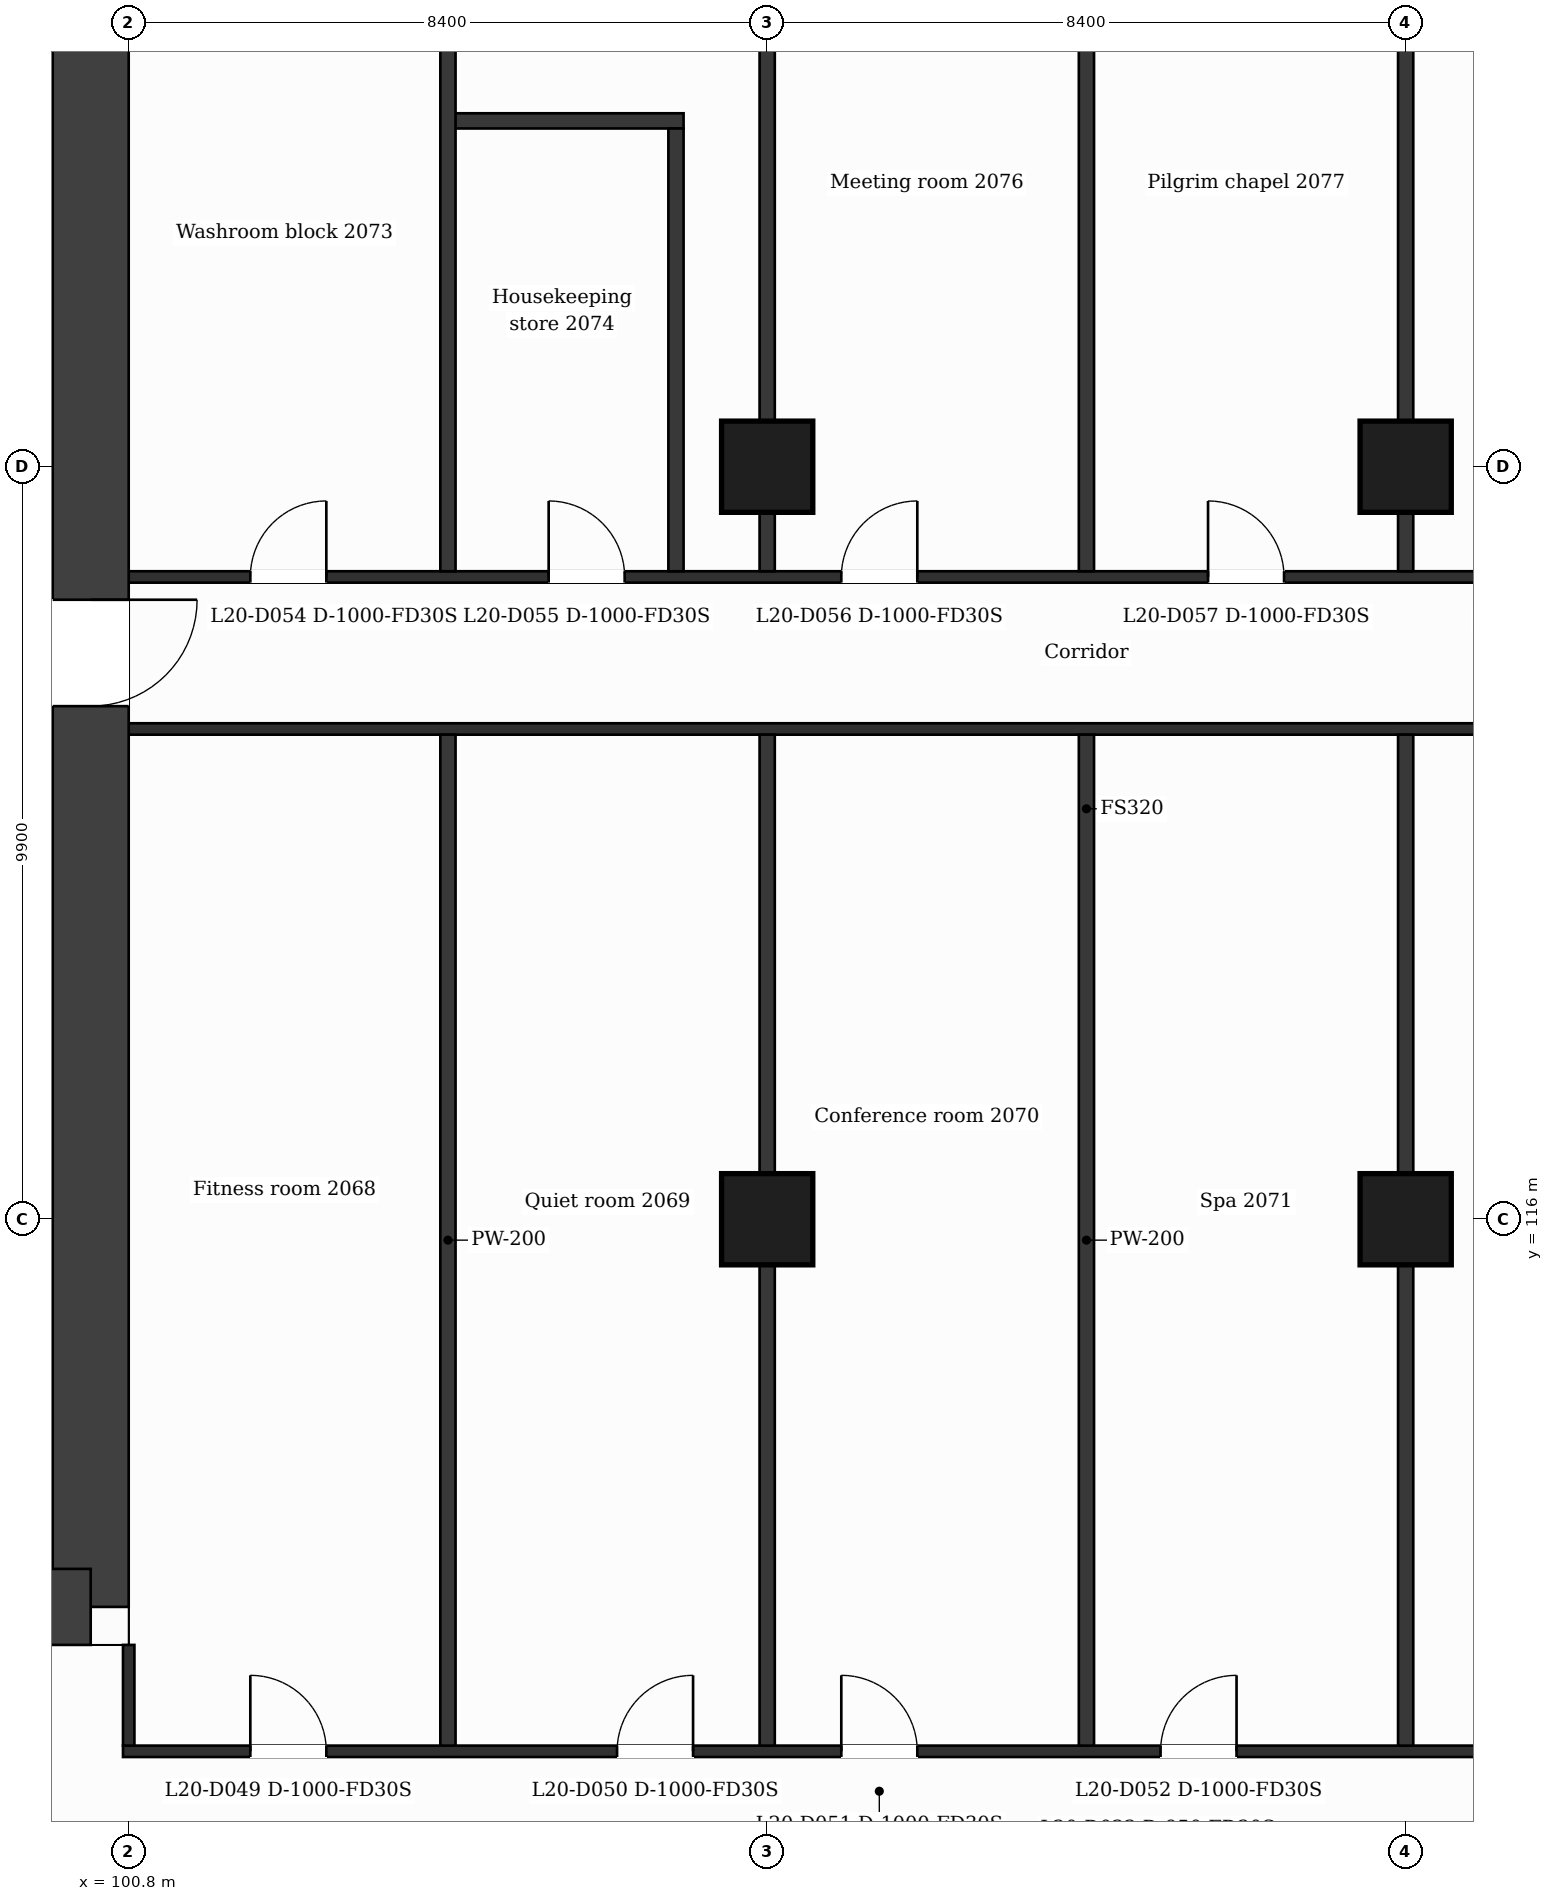
"""IFC4 building model, lengths in metres.
Left out: names, types, materials, properties, quantities, classifications, styles, units other than length and angle.
Written with IfcOpenShell. Run it as: python <this file> out.ifc"""

import sys

from ifc_helpers import new_model, si_unit, direction, frame, frame_2d, origin, origin_2d, place, context, subcontext, project, spatial, rectangle, extrude, element, fill, save


model = new_model("IFC4")
c1 = context("Model", 3, precision=1e-05, world=origin(), true_north=direction((0.0, 1.0)))
c2 = subcontext(c1, "Body", "Model", "MODEL_VIEW")
j1 = project(units=[si_unit("LENGTHUNIT", "METRE"), si_unit("PLANEANGLEUNIT", "RADIAN")], contexts=[c1])
p1 = place(None, origin())
s1 = spatial("IfcSite", under=j1, at=p1, CompositionType="ELEMENT")
p2 = place(p1, origin())
s2 = spatial("IfcBuilding", under=s1, at=p2, CompositionType="ELEMENT")
p3 = place(p2, frame((0.0, 0.0, 91.0)))
s3 = spatial("IfcBuildingStorey", under=s2, at=p3, CompositionType="ELEMENT", Elevation=91.0)
p4 = place(p3, frame((100.3, 131.9, 0.0), z_axis=(0.0, 0.0, 1.0), x_axis=(0.0, -1.0, 0.0)))
e1 = element("IfcWall", 1, at=p4, inside=s3, PredefinedType="SHEAR", context=c2, shape_type="SweptSolid", body=[
    extrude(rectangle(XDim=21.0, YDim=1.0, at=frame_2d((10.5, 0.0))), origin(), (0.0, 0.0, 1.0), 3.7),
])
p5 = place(p4, frame((7.75, 0.0, 0.0)))
e2 = element("IfcOpeningElement", 2, at=p5, cuts=e1, PredefinedType="OPENING", context=c2, shape_type="SweptSolid", body=[
    extrude(rectangle(XDim=1.4, YDim=2.1, at=frame_2d((0.7, 1.05))), frame((0.0, 0.51, 0.0), z_axis=(0.0, -1.0, 0.0), x_axis=(1.0, 0.0, 0.0)), (0.0, 0.0, 1.0), 1.02),
])
p6 = place(p3, frame((100.3, 110.9, 0.0), z_axis=(0.0, 0.0, 1.0), x_axis=(-1.0, 0.0, 0.0)))
e3 = element("IfcWall", 3, at=p6, inside=s3, PredefinedType="SHEAR", context=c2, shape_type="SweptSolid", body=[
    extrude(rectangle(XDim=14.059, YDim=1.0, at=frame_2d((7.03, 0.0))), origin(), (0.0, 0.0, 1.0), 3.7),
])
p7 = place(p6, frame((5.802, 0.0, 0.0)))
e4 = element("IfcOpeningElement", 4, at=p7, cuts=e3, PredefinedType="OPENING", context=c2, shape_type="SweptSolid", body=[
    extrude(rectangle(XDim=1.4, YDim=2.1, at=frame_2d((0.7, 1.05))), frame((0.0, 0.51, 0.0), z_axis=(0.0, -1.0, 0.0), x_axis=(1.0, 0.0, 0.0)), (0.0, 0.0, 1.0), 1.02),
])
p8 = place(p3, frame((94.9, 116.5, 0.0), z_axis=(0.0, 0.0, 1.0), x_axis=(1.0, 0.0, 0.0)))
e5 = element("IfcWall", 5, at=p8, inside=s3, PredefinedType="SHEAR", context=c2, shape_type="SweptSolid", body=[
    extrude(rectangle(XDim=4.9, YDim=1.0, at=frame_2d((2.45, 0.0))), origin(), (0.0, 0.0, 1.0), 3.7),
])
for number, where, z_axis, x_axis in (
    (6, (109.2, 116.0, 0.0), (0.0, 0.0, 1.0), (1.0, 0.0, 0.0)),
    (7, (117.6, 116.0, 0.0), (0.0, 0.0, 1.0), (1.0, 0.0, 0.0)),
    (8, (109.2, 125.9, 0.0), (0.0, 0.0, 1.0), (1.0, 0.0, 0.0)),
    (9, (117.6, 125.9, 0.0), (0.0, 0.0, 1.0), (1.0, 0.0, 0.0)),
):
    element("IfcColumn", number, at=place(p3, frame(where, z_axis=z_axis, x_axis=x_axis)), inside=s3, PredefinedType="COLUMN", context=c2, shape_type="SweptSolid", body=[
        extrude(rectangle(XDim=1.2, YDim=1.2, at=origin_2d()), origin(), (0.0, 0.0, 1.0), 3.7),
    ])
p9 = place(p3, frame((100.725, 109.0, 0.0), z_axis=(0.0, 0.0, 1.0), x_axis=(1.0, 0.0, 0.0)))
e10 = element("IfcWall", 10, at=p9, inside=s3, PredefinedType="PARTITIONING", context=c2, shape_type="SweptSolid", body=[
    extrude(rectangle(XDim=25.35, YDim=0.15, at=frame_2d((12.675, 0.0))), origin(), (0.0, 0.0, 1.0), 3.38),
])
p10 = place(p9, frame((1.675, 0.0, 0.0)))
e11 = element("IfcOpeningElement", 11, at=p10, cuts=e10, PredefinedType="OPENING", context=c2, shape_type="SweptSolid", body=[
    extrude(rectangle(XDim=1.0, YDim=2.1, at=frame_2d((0.5, 1.05))), frame((0.0, 0.085, 0.0), z_axis=(0.0, -1.0, 0.0), x_axis=(1.0, 0.0, 0.0)), (0.0, 0.0, 1.0), 0.17),
])
p11 = place(p9, frame((6.5, 0.0, 0.0)))
e12 = element("IfcOpeningElement", 12, at=p11, cuts=e10, PredefinedType="OPENING", context=c2, shape_type="SweptSolid", body=[
    extrude(rectangle(XDim=1.0, YDim=2.1, at=frame_2d((0.5, 1.05))), frame((0.0, 0.085, 0.0), z_axis=(0.0, -1.0, 0.0), x_axis=(1.0, 0.0, 0.0)), (0.0, 0.0, 1.0), 0.17),
])
p12 = place(p9, frame((9.45, 0.0, 0.0)))
e13 = element("IfcOpeningElement", 13, at=p12, cuts=e10, PredefinedType="OPENING", context=c2, shape_type="SweptSolid", body=[
    extrude(rectangle(XDim=1.0, YDim=2.1, at=frame_2d((0.5, 1.05))), frame((0.0, 0.085, 0.0), z_axis=(0.0, -1.0, 0.0), x_axis=(1.0, 0.0, 0.0)), (0.0, 0.0, 1.0), 0.17),
])
p13 = place(p9, frame((13.65, 0.0, 0.0)))
e14 = element("IfcOpeningElement", 14, at=p13, cuts=e10, PredefinedType="OPENING", context=c2, shape_type="SweptSolid", body=[
    extrude(rectangle(XDim=1.0, YDim=2.1, at=frame_2d((0.5, 1.05))), frame((0.0, 0.085, 0.0), z_axis=(0.0, -1.0, 0.0), x_axis=(1.0, 0.0, 0.0)), (0.0, 0.0, 1.0), 0.17),
])
p14 = place(p9, frame((20.575, 0.0, 0.0)))
e15 = element("IfcOpeningElement", 15, at=p14, cuts=e10, PredefinedType="OPENING", context=c2, shape_type="SweptSolid", body=[
    extrude(rectangle(XDim=1.0, YDim=2.1, at=frame_2d((0.5, 1.05))), frame((0.0, 0.085, 0.0), z_axis=(0.0, -1.0, 0.0), x_axis=(1.0, 0.0, 0.0)), (0.0, 0.0, 1.0), 0.17),
])
for number, where, z_axis, x_axis in (
    (16, (95.227, 117.2, 0.0), (0.0, 0.0, 1.0), (1.0, 0.0, 0.0)),
    (17, (95.227, 118.8, 0.0), (0.0, 0.0, 1.0), (1.0, 0.0, 0.0)),
):
    element("IfcWall", number, at=place(p3, frame(where, z_axis=z_axis, x_axis=x_axis)), inside=s3, PredefinedType="PARTITIONING", context=c2, shape_type="SweptSolid", body=[
        extrude(rectangle(XDim=4.573, YDim=0.2, at=frame_2d((2.287, 0.0))), origin(), (0.0, 0.0, 1.0), 3.38),
    ])
p15 = place(p3, frame((95.227, 122.1, 0.0), z_axis=(0.0, 0.0, 1.0), x_axis=(1.0, 0.0, 0.0)))
e18 = element("IfcWall", 18, at=p15, inside=s3, PredefinedType="PARTITIONING", context=c2, shape_type="SweptSolid", body=[
    extrude(rectangle(XDim=4.573, YDim=0.2, at=frame_2d((2.287, 0.0))), origin(), (0.0, 0.0, 1.0), 3.38),
])
p16 = place(p15, frame((0.522, 0.0, 0.0)))
e19 = element("IfcOpeningElement", 19, at=p16, cuts=e18, PredefinedType="OPENING", context=c2, shape_type="SweptSolid", body=[
    extrude(rectangle(XDim=0.9, YDim=2.1, at=frame_2d((0.45, 1.05))), frame((0.0, 0.11, 0.0), z_axis=(0.0, -1.0, 0.0), x_axis=(1.0, 0.0, 0.0)), (0.0, 0.0, 1.0), 0.22),
])
p17 = place(p15, frame((2.98, 0.0, 0.0)))
e20 = element("IfcOpeningElement", 20, at=p17, cuts=e18, PredefinedType="OPENING", context=c2, shape_type="SweptSolid", body=[
    extrude(rectangle(XDim=0.9, YDim=2.1, at=frame_2d((0.45, 1.05))), frame((0.0, 0.11, 0.0), z_axis=(0.0, -1.0, 0.0), x_axis=(1.0, 0.0, 0.0)), (0.0, 0.0, 1.0), 0.22),
])
p18 = place(p3, frame((100.8, 122.45, 0.0), z_axis=(0.0, 0.0, 1.0), x_axis=(1.0, 0.0, 0.0)))
e21 = element("IfcWall", 21, at=p18, inside=s3, PredefinedType="PARTITIONING", context=c2, shape_type="SweptSolid", body=[
    extrude(rectangle(XDim=25.2, YDim=0.15, at=frame_2d((12.6, 0.0))), origin(), (0.0, 0.0, 1.0), 3.38),
])
p19 = place(p3, frame((100.8, 124.45, 0.0), z_axis=(0.0, 0.0, 1.0), x_axis=(1.0, 0.0, 0.0)))
e22 = element("IfcWall", 22, at=p19, inside=s3, PredefinedType="PARTITIONING", context=c2, shape_type="SweptSolid", body=[
    extrude(rectangle(XDim=25.2, YDim=0.15, at=frame_2d((12.6, 0.0))), origin(), (0.0, 0.0, 1.0), 3.38),
])
p20 = place(p19, frame((1.6, 0.0, 0.0)))
e23 = element("IfcOpeningElement", 23, at=p20, cuts=e22, PredefinedType="OPENING", context=c2, shape_type="SweptSolid", body=[
    extrude(rectangle(XDim=1.0, YDim=2.1, at=frame_2d((0.5, 1.05))), frame((0.0, 0.085, 0.0), z_axis=(0.0, -1.0, 0.0), x_axis=(1.0, 0.0, 0.0)), (0.0, 0.0, 1.0), 0.17),
])
p21 = place(p19, frame((5.525, 0.0, 0.0)))
e24 = element("IfcOpeningElement", 24, at=p21, cuts=e22, PredefinedType="OPENING", context=c2, shape_type="SweptSolid", body=[
    extrude(rectangle(XDim=1.0, YDim=2.1, at=frame_2d((0.5, 1.05))), frame((0.0, 0.085, 0.0), z_axis=(0.0, -1.0, 0.0), x_axis=(1.0, 0.0, 0.0)), (0.0, 0.0, 1.0), 0.17),
])
p22 = place(p19, frame((9.375, 0.0, 0.0)))
e25 = element("IfcOpeningElement", 25, at=p22, cuts=e22, PredefinedType="OPENING", context=c2, shape_type="SweptSolid", body=[
    extrude(rectangle(XDim=1.0, YDim=2.1, at=frame_2d((0.5, 1.05))), frame((0.0, 0.085, 0.0), z_axis=(0.0, -1.0, 0.0), x_axis=(1.0, 0.0, 0.0)), (0.0, 0.0, 1.0), 0.17),
])
p23 = place(p19, frame((14.2, 0.0, 0.0)))
e26 = element("IfcOpeningElement", 26, at=p23, cuts=e22, PredefinedType="OPENING", context=c2, shape_type="SweptSolid", body=[
    extrude(rectangle(XDim=1.0, YDim=2.1, at=frame_2d((0.5, 1.05))), frame((0.0, 0.085, 0.0), z_axis=(0.0, -1.0, 0.0), x_axis=(1.0, 0.0, 0.0)), (0.0, 0.0, 1.0), 0.17),
])
p24 = place(p19, frame((18.825, 0.0, 0.0)))
e27 = element("IfcOpeningElement", 27, at=p24, cuts=e22, PredefinedType="OPENING", context=c2, shape_type="SweptSolid", body=[
    extrude(rectangle(XDim=1.0, YDim=2.1, at=frame_2d((0.5, 1.05))), frame((0.0, 0.085, 0.0), z_axis=(0.0, -1.0, 0.0), x_axis=(1.0, 0.0, 0.0)), (0.0, 0.0, 1.0), 0.17),
])
p25 = place(p3, frame((105.0, 130.45, 0.0), z_axis=(0.0, 0.0, 1.0), x_axis=(1.0, 0.0, 0.0)))
e28 = element("IfcWall", 28, at=p25, inside=s3, PredefinedType="PARTITIONING", context=c2, shape_type="SweptSolid", body=[
    extrude(rectangle(XDim=3.1, YDim=0.2, at=frame_2d((1.55, 0.0))), origin(), (0.0, 0.0, 1.0), 3.38),
])
p26 = place(p3, frame((100.8, 109.075, 0.0), z_axis=(0.0, 0.0, 1.0), x_axis=(0.0, 1.0, 0.0)))
e29 = element("IfcWall", 29, at=p26, inside=s3, PredefinedType="PARTITIONING", context=c2, shape_type="SweptSolid", body=[
    extrude(rectangle(XDim=1.325, YDim=0.15, at=frame_2d((0.663, 0.0))), origin(), (0.0, 0.0, 1.0), 3.38),
])
p27 = place(p3, frame((105.0, 109.075, 0.0), z_axis=(0.0, 0.0, 1.0), x_axis=(0.0, 1.0, 0.0)))
e30 = element("IfcWall", 30, at=p27, inside=s3, PredefinedType="PARTITIONING", context=c2, shape_type="SweptSolid", body=[
    extrude(rectangle(XDim=13.3, YDim=0.2, at=frame_2d((6.65, 0.0))), origin(), (0.0, 0.0, 1.0), 3.38),
])
p28 = place(p3, frame((105.0, 124.525, 0.0), z_axis=(0.0, 0.0, 1.0), x_axis=(0.0, 1.0, 0.0)))
e31 = element("IfcWall", 31, at=p28, inside=s3, PredefinedType="PARTITIONING", context=c2, shape_type="SweptSolid", body=[
    extrude(rectangle(XDim=9.2, YDim=0.2, at=frame_2d((4.6, 0.0))), origin(), (0.0, 0.0, 1.0), 3.38),
])
p29 = place(p3, frame((108.0, 124.525, 0.0), z_axis=(0.0, 0.0, 1.0), x_axis=(0.0, 1.0, 0.0)))
e32 = element("IfcWall", 32, at=p29, inside=s3, PredefinedType="PARTITIONING", context=c2, shape_type="SweptSolid", body=[
    extrude(rectangle(XDim=5.825, YDim=0.2, at=frame_2d((2.913, 0.0))), origin(), (0.0, 0.0, 1.0), 3.38),
])
p30 = place(p3, frame((109.2, 109.075, 0.0), z_axis=(0.0, 0.0, 1.0), x_axis=(0.0, 1.0, 0.0)))
e33 = element("IfcWall", 33, at=p30, inside=s3, PredefinedType="PARTITIONING", context=c2, shape_type="SweptSolid", body=[
    extrude(rectangle(XDim=13.3, YDim=0.2, at=frame_2d((6.65, 0.0))), origin(), (0.0, 0.0, 1.0), 3.38),
])
p31 = place(p3, frame((109.2, 124.525, 0.0), z_axis=(0.0, 0.0, 1.0), x_axis=(0.0, 1.0, 0.0)))
e34 = element("IfcWall", 34, at=p31, inside=s3, PredefinedType="PARTITIONING", context=c2, shape_type="SweptSolid", body=[
    extrude(rectangle(XDim=9.2, YDim=0.2, at=frame_2d((4.6, 0.0))), origin(), (0.0, 0.0, 1.0), 3.38),
])
p32 = place(p3, frame((113.4, 109.075, 0.0), z_axis=(0.0, 0.0, 1.0), x_axis=(0.0, 1.0, 0.0)))
e35 = element("IfcWall", 35, at=p32, inside=s3, PredefinedType="PARTITIONING", context=c2, shape_type="SweptSolid", body=[
    extrude(rectangle(XDim=13.3, YDim=0.2, at=frame_2d((6.65, 0.0))), origin(), (0.0, 0.0, 1.0), 3.38),
])
p33 = place(p3, frame((113.4, 124.525, 0.0), z_axis=(0.0, 0.0, 1.0), x_axis=(0.0, 1.0, 0.0)))
e36 = element("IfcWall", 36, at=p33, inside=s3, PredefinedType="PARTITIONING", context=c2, shape_type="SweptSolid", body=[
    extrude(rectangle(XDim=9.2, YDim=0.2, at=frame_2d((4.6, 0.0))), origin(), (0.0, 0.0, 1.0), 3.38),
])
p34 = place(p3, frame((117.6, 109.075, 0.0), z_axis=(0.0, 0.0, 1.0), x_axis=(0.0, 1.0, 0.0)))
e37 = element("IfcWall", 37, at=p34, inside=s3, PredefinedType="PARTITIONING", context=c2, shape_type="SweptSolid", body=[
    extrude(rectangle(XDim=13.3, YDim=0.2, at=frame_2d((6.65, 0.0))), origin(), (0.0, 0.0, 1.0), 3.38),
])
p35 = place(p3, frame((117.6, 124.525, 0.0), z_axis=(0.0, 0.0, 1.0), x_axis=(0.0, 1.0, 0.0)))
e38 = element("IfcWall", 38, at=p35, inside=s3, PredefinedType="PARTITIONING", context=c2, shape_type="SweptSolid", body=[
    extrude(rectangle(XDim=9.2, YDim=0.2, at=frame_2d((4.6, 0.0))), origin(), (0.0, 0.0, 1.0), 3.38),
])
p36 = place(p10, origin())
e39 = element("IfcDoor", 39, at=p36, inside=s3, OperationType="SINGLE_SWING_LEFT", PredefinedType="DOOR", context=c2, shape_type="SweptSolid", body=[
    extrude(rectangle(XDim=1.0, YDim=2.1, at=frame_2d((0.5, 1.05))), frame((0.0, 0.025, 0.0), z_axis=(0.0, -1.0, 0.0), x_axis=(1.0, 0.0, 0.0)), (0.0, 0.0, 1.0), 0.05),
])
fill(e11, e39)
p37 = place(p11, origin())
e40 = element("IfcDoor", 40, at=p37, inside=s3, OperationType="SINGLE_SWING_RIGHT", PredefinedType="DOOR", context=c2, shape_type="SweptSolid", body=[
    extrude(rectangle(XDim=1.0, YDim=2.1, at=frame_2d((0.5, 1.05))), frame((0.0, 0.025, 0.0), z_axis=(0.0, -1.0, 0.0), x_axis=(1.0, 0.0, 0.0)), (0.0, 0.0, 1.0), 0.05),
])
fill(e12, e40)
p38 = place(p12, origin())
e41 = element("IfcDoor", 41, at=p38, inside=s3, OperationType="SINGLE_SWING_LEFT", PredefinedType="DOOR", context=c2, shape_type="SweptSolid", body=[
    extrude(rectangle(XDim=1.0, YDim=2.1, at=frame_2d((0.5, 1.05))), frame((0.0, 0.025, 0.0), z_axis=(0.0, -1.0, 0.0), x_axis=(1.0, 0.0, 0.0)), (0.0, 0.0, 1.0), 0.05),
])
fill(e13, e41)
p39 = place(p13, origin())
e42 = element("IfcDoor", 42, at=p39, inside=s3, OperationType="SINGLE_SWING_RIGHT", PredefinedType="DOOR", context=c2, shape_type="SweptSolid", body=[
    extrude(rectangle(XDim=1.0, YDim=2.1, at=frame_2d((0.5, 1.05))), frame((0.0, 0.025, 0.0), z_axis=(0.0, -1.0, 0.0), x_axis=(1.0, 0.0, 0.0)), (0.0, 0.0, 1.0), 0.05),
])
fill(e14, e42)
p40 = place(p20, origin())
e43 = element("IfcDoor", 43, at=p40, inside=s3, OperationType="SINGLE_SWING_RIGHT", PredefinedType="DOOR", context=c2, shape_type="SweptSolid", body=[
    extrude(rectangle(XDim=1.0, YDim=2.1, at=frame_2d((0.5, 1.05))), frame((0.0, 0.025, 0.0), z_axis=(0.0, -1.0, 0.0), x_axis=(1.0, 0.0, 0.0)), (0.0, 0.0, 1.0), 0.05),
])
fill(e23, e43)
p41 = place(p21, origin())
e44 = element("IfcDoor", 44, at=p41, inside=s3, OperationType="SINGLE_SWING_LEFT", PredefinedType="DOOR", context=c2, shape_type="SweptSolid", body=[
    extrude(rectangle(XDim=1.0, YDim=2.1, at=frame_2d((0.5, 1.05))), frame((0.0, 0.025, 0.0), z_axis=(0.0, -1.0, 0.0), x_axis=(1.0, 0.0, 0.0)), (0.0, 0.0, 1.0), 0.05),
])
fill(e24, e44)
p42 = place(p22, origin())
e45 = element("IfcDoor", 45, at=p42, inside=s3, OperationType="SINGLE_SWING_RIGHT", PredefinedType="DOOR", context=c2, shape_type="SweptSolid", body=[
    extrude(rectangle(XDim=1.0, YDim=2.1, at=frame_2d((0.5, 1.05))), frame((0.0, 0.025, 0.0), z_axis=(0.0, -1.0, 0.0), x_axis=(1.0, 0.0, 0.0)), (0.0, 0.0, 1.0), 0.05),
])
fill(e25, e45)
p43 = place(p23, origin())
e46 = element("IfcDoor", 46, at=p43, inside=s3, OperationType="SINGLE_SWING_LEFT", PredefinedType="DOOR", context=c2, shape_type="SweptSolid", body=[
    extrude(rectangle(XDim=1.0, YDim=2.1, at=frame_2d((0.5, 1.05))), frame((0.0, 0.025, 0.0), z_axis=(0.0, -1.0, 0.0), x_axis=(1.0, 0.0, 0.0)), (0.0, 0.0, 1.0), 0.05),
])
fill(e26, e46)
p44 = place(p5, origin())
e47 = element("IfcDoor", 47, at=p44, inside=s3, OperationType="SINGLE_SWING_LEFT", PredefinedType="DOOR", context=c2, shape_type="SweptSolid", body=[
    extrude(rectangle(XDim=1.4, YDim=2.1, at=frame_2d((0.7, 1.05))), frame((0.0, 0.025, 0.0), z_axis=(0.0, -1.0, 0.0), x_axis=(1.0, 0.0, 0.0)), (0.0, 0.0, 1.0), 0.05),
])
fill(e2, e47)
save(model, sys.argv[1])
